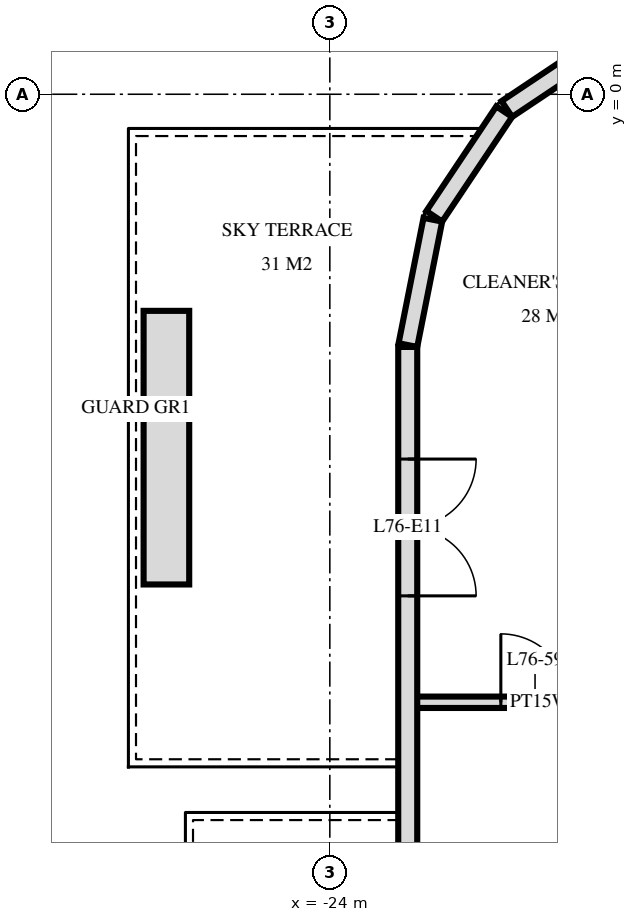
"""IFC4 building model, lengths in metres.
Left out: names, types, materials, properties, quantities, classifications, styles, units other than length and angle.
Written with IfcOpenShell. Run it as: python <this file> out.ifc"""

import sys

from ifc_helpers import new_model, si_unit, direction, frame, frame_2d, origin, place, context, subcontext, project, spatial, rectangle, extrude, element, fill, save


model = new_model("IFC4")
c1 = context("Model", 3, precision=1e-05, world=origin(), true_north=direction((0.0, 1.0)))
c2 = subcontext(c1, "Body", "Model", "MODEL_VIEW")
j1 = project(units=[si_unit("LENGTHUNIT", "METRE"), si_unit("PLANEANGLEUNIT", "RADIAN")], contexts=[c1])
p1 = place(None, origin())
s1 = spatial("IfcSite", under=j1, at=p1, CompositionType="ELEMENT")
p2 = place(p1, origin())
s2 = spatial("IfcBuilding", under=s1, at=p2, CompositionType="ELEMENT")
p3 = place(p2, frame((0.0, 0.0, 287.6)))
s3 = spatial("IfcBuildingStorey", under=s2, at=p3, CompositionType="ELEMENT", Elevation=287.6)
for number, where, z_axis, x_axis in (
    (1, (-20.294, 0.726, 0.0), (0.0, 0.0, 1.0), (-0.831, -0.556, 0.0)),
    (2, (-21.706, -0.229, 0.0), (0.0, 0.0, 1.0), (-0.556, -0.831, 0.0)),
):
    element("IfcWall", number, at=place(p3, frame(where, z_axis=z_axis, x_axis=x_axis)), inside=s3, PredefinedType="SOLIDWALL", context=c2, shape_type="SweptSolid", body=[
        extrude(rectangle(XDim=1.656, YDim=0.25, at=frame_2d((0.828, 0.0))), origin(), (0.0, 0.0, 1.0), 3.22),
    ])
p4 = place(p3, frame((-22.645, -1.651, 0.0), z_axis=(0.0, 0.0, 1.0), x_axis=(-0.19513878023, -0.980775640221, 0.0)))
e3 = element("IfcWall", 3, at=p4, inside=s3, PredefinedType="SOLIDWALL", context=c2, shape_type="SweptSolid", body=[
    extrude(rectangle(XDim=1.681, YDim=0.25, at=frame_2d((0.841, 0.0))), origin(), (0.0, 0.0, 1.0), 3.22),
])
p5 = place(p3, frame((-22.975, -3.325, 0.0), z_axis=(0.0, 0.0, 1.0), x_axis=(0.0, -1.0, 0.0)))
e4 = element("IfcWall", 4, at=p5, inside=s3, PredefinedType="SOLIDWALL", context=c2, shape_type="SweptSolid", body=[
    extrude(rectangle(XDim=25.951, YDim=0.25, at=frame_2d((12.975, 0.0))), origin(), (0.0, 0.0, 1.0), 3.22),
])
p6 = place(p5, frame((1.475, 0.0, 0.0)))
e5 = element("IfcOpeningElement", 5, at=p6, cuts=e4, PredefinedType="OPENING", context=c2, shape_type="SweptSolid", body=[
    extrude(rectangle(XDim=1.8, YDim=2.4, at=frame_2d((0.9, 1.2))), frame((0.0, 0.135, 0.0), z_axis=(0.0, -1.0, 0.0), x_axis=(1.0, 0.0, 0.0)), (0.0, 0.0, 1.0), 0.27),
])
p7 = place(p5, frame((7.975, 0.0, 0.0)))
e6 = element("IfcOpeningElement", 6, at=p7, cuts=e4, PredefinedType="OPENING", context=c2, shape_type="SweptSolid", body=[
    extrude(rectangle(XDim=1.8, YDim=2.4, at=frame_2d((0.9, 1.2))), frame((0.0, 0.135, 0.0), z_axis=(0.0, -1.0, 0.0), x_axis=(1.0, 0.0, 0.0)), (0.0, 0.0, 1.0), 0.27),
])
p8 = place(p5, frame((18.175, 0.0, 0.0)))
e7 = element("IfcOpeningElement", 7, at=p8, cuts=e4, PredefinedType="OPENING", context=c2, shape_type="SweptSolid", body=[
    extrude(rectangle(XDim=1.8, YDim=2.4, at=frame_2d((0.9, 1.2))), frame((0.0, 0.135, 0.0), z_axis=(0.0, -1.0, 0.0), x_axis=(1.0, 0.0, 0.0)), (0.0, 0.0, 1.0), 0.27),
])
p9 = place(p5, frame((21.075, 0.0, 0.0)))
e8 = element("IfcOpeningElement", 8, at=p9, cuts=e4, PredefinedType="OPENING", context=c2, shape_type="SweptSolid", body=[
    extrude(rectangle(XDim=1.8, YDim=2.4, at=frame_2d((0.9, 1.2))), frame((0.0, 0.135, 0.0), z_axis=(0.0, -1.0, 0.0), x_axis=(1.0, 0.0, 0.0)), (0.0, 0.0, 1.0), 0.27),
])
p10 = place(p5, frame((23.825, 0.0, 0.9)))
e9 = element("IfcOpeningElement", 9, at=p10, cuts=e4, PredefinedType="OPENING", context=c2, shape_type="SweptSolid", body=[
    extrude(rectangle(XDim=1.8, YDim=1.5, at=frame_2d((0.9, 0.75))), frame((0.0, 0.135, 0.0), z_axis=(0.0, -1.0, 0.0), x_axis=(1.0, 0.0, 0.0)), (0.0, 0.0, 1.0), 0.27),
])
p11 = place(p3, frame((-26.15, -6.45, 0.0), z_axis=(0.0, 0.0, 1.0), x_axis=(0.0, 1.0, 0.0)))
e10 = element("IfcWall", 10, at=p11, inside=s3, PredefinedType="USERDEFINED", context=c2, shape_type="SweptSolid", body=[
    extrude(rectangle(XDim=3.6, YDim=0.6, at=frame_2d((1.8, 0.0))), origin(), (0.0, 0.0, 1.0), 0.65),
])
p12 = place(p3, frame((-22.92, -8.0, 0.0), z_axis=(0.0, 0.0, 1.0), x_axis=(1.0, 0.0, 0.0)))
e11 = element("IfcWall", 11, at=p12, inside=s3, PredefinedType="PLUMBINGWALL", context=c2, shape_type="SweptSolid", body=[
    extrude(rectangle(XDim=3.37, YDim=0.15, at=frame_2d((1.685, 0.0))), origin(), (0.0, 0.0, 1.0), 3.22),
])
p13 = place(p12, frame((1.17, 0.0, 0.0)))
e12 = element("IfcOpeningElement", 12, at=p13, cuts=e11, PredefinedType="OPENING", context=c2, shape_type="SweptSolid", body=[
    extrude(rectangle(XDim=0.9, YDim=2.1, at=frame_2d((0.45, 1.05))), frame((0.0, 0.085, 0.0), z_axis=(0.0, -1.0, 0.0), x_axis=(1.0, 0.0, 0.0)), (0.0, 0.0, 1.0), 0.17),
])
p14 = place(p6, origin())
e13 = element("IfcDoor", 13, at=p14, inside=s3, OperationType="DOUBLE_DOOR_SINGLE_SWING", PredefinedType="DOOR", context=c2, shape_type="SweptSolid", body=[
    extrude(rectangle(XDim=1.8, YDim=2.4, at=frame_2d((0.9, 1.2))), frame((0.0, 0.025, 0.0), z_axis=(0.0, -1.0, 0.0), x_axis=(1.0, 0.0, 0.0)), (0.0, 0.0, 1.0), 0.05),
])
fill(e5, e13)
p15 = place(p13, origin())
e14 = element("IfcDoor", 14, at=p15, inside=s3, OperationType="SINGLE_SWING_RIGHT", PredefinedType="DOOR", context=c2, shape_type="SweptSolid", body=[
    extrude(rectangle(XDim=0.9, YDim=2.1, at=frame_2d((0.45, 1.05))), frame((0.0, 0.025, 0.0), z_axis=(0.0, -1.0, 0.0), x_axis=(1.0, 0.0, 0.0)), (0.0, 0.0, 1.0), 0.05),
])
fill(e12, e14)
save(model, sys.argv[1])
